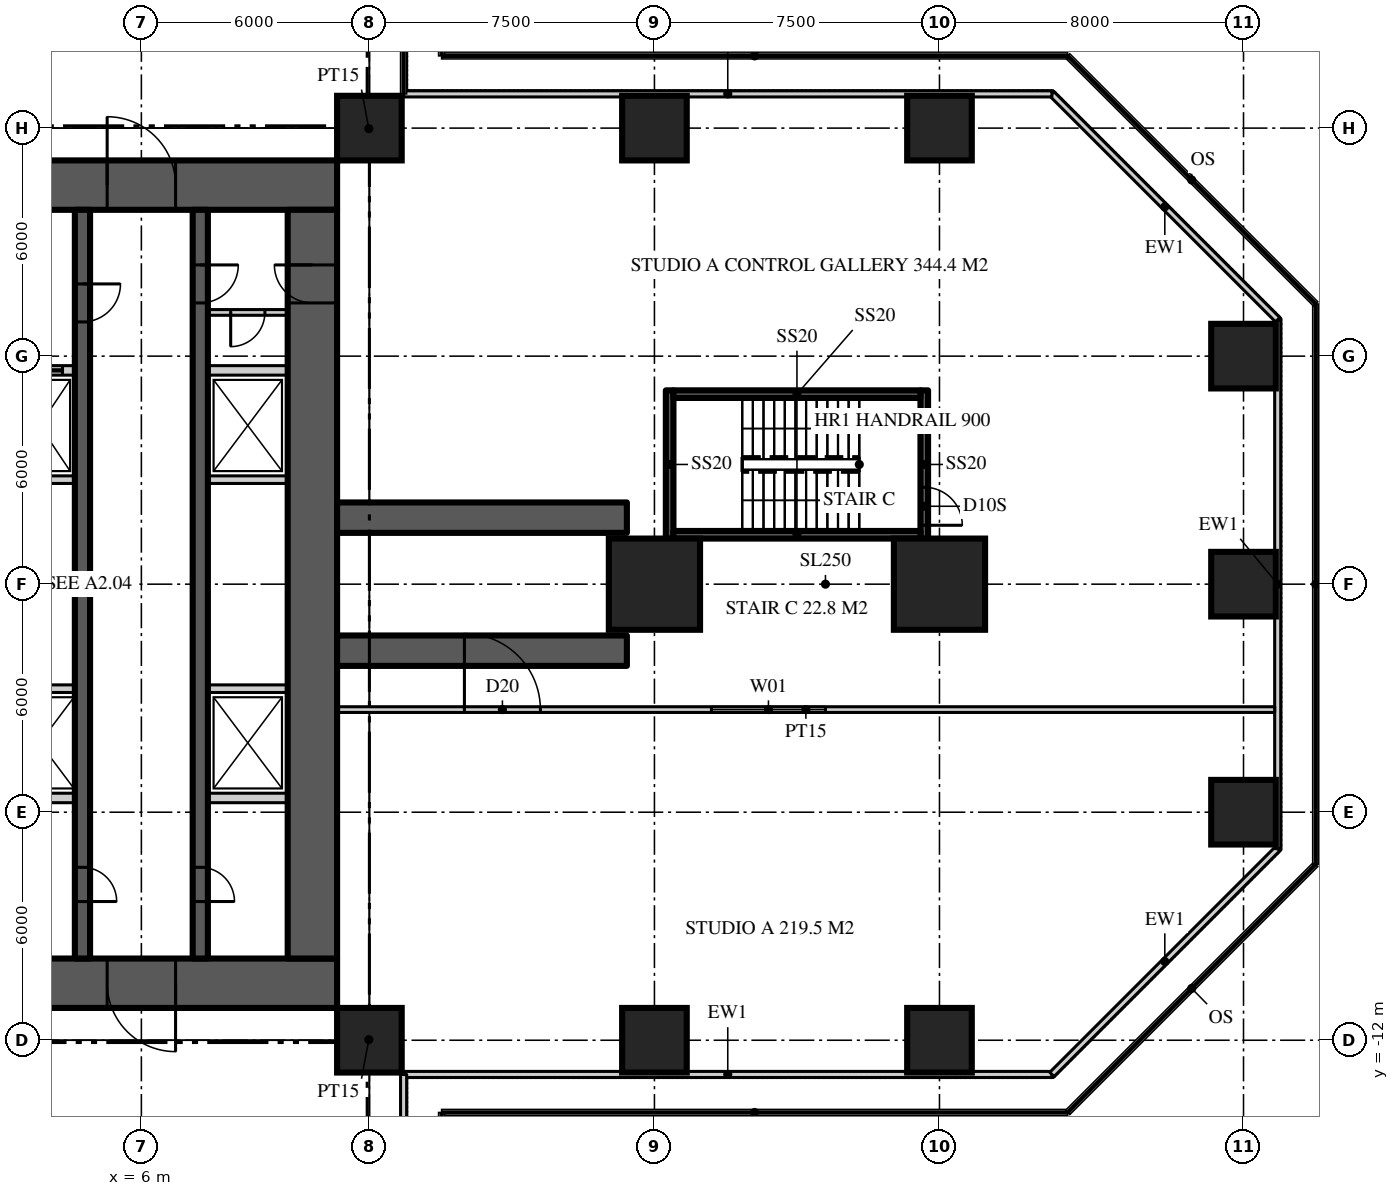
"""IFC4 building model, lengths in metres.
Left out: names, types, materials, properties, quantities, classifications, styles, units other than length and angle.
Written with IfcOpenShell. Run it as: python <this file> out.ifc"""

import sys

from ifc_helpers import new_model, si_unit, direction, frame, frame_2d, origin, origin_2d, place, context, subcontext, project, spatial, rectangle, extrude, element, fill, save


model = new_model("IFC4")
c1 = context("Model", 3, precision=1e-05, world=origin(), true_north=direction((0.0, 1.0)))
c2 = subcontext(c1, "Body", "Model", "MODEL_VIEW")
j1 = project(units=[si_unit("LENGTHUNIT", "METRE"), si_unit("PLANEANGLEUNIT", "RADIAN")], contexts=[c1])
p1 = place(None, origin())
s1 = spatial("IfcSite", under=j1, at=p1, CompositionType="ELEMENT")
p2 = place(p1, origin())
s2 = spatial("IfcBuilding", under=s1, at=p2, CompositionType="ELEMENT")
p3 = place(p2, frame((0.0, 0.0, 7.0)))
s3 = spatial("IfcBuildingStorey", under=s2, at=p3, CompositionType="ELEMENT", Elevation=7.0)
p4 = place(p3, frame((-11.15, 10.5, 0.0), z_axis=(0.0, 0.0, 1.0), x_axis=(1.0, 0.0, 0.0)))
e1 = element("IfcWall", 1, at=p4, inside=s3, PredefinedType="SHEAR", context=c2, shape_type="SweptSolid", body=[
    extrude(rectangle(XDim=22.3, YDim=1.3, at=frame_2d((11.15, 0.0))), origin(), (0.0, 0.0, 1.0), 8.0),
])
p5 = place(p4, frame((4.25, 0.0, 0.0)))
e2 = element("IfcOpeningElement", 2, at=p5, cuts=e1, PredefinedType="OPENING", context=c2, shape_type="SweptSolid", body=[
    extrude(rectangle(XDim=1.8, YDim=2.2, at=frame_2d((0.9, 1.1))), frame((0.0, 0.66, 0.0), z_axis=(0.0, -1.0, 0.0), x_axis=(1.0, 0.0, 0.0)), (0.0, 0.0, 1.0), 1.32),
])
p6 = place(p4, frame((16.25, 0.0, 0.0)))
e3 = element("IfcOpeningElement", 3, at=p6, cuts=e1, PredefinedType="OPENING", context=c2, shape_type="SweptSolid", body=[
    extrude(rectangle(XDim=1.8, YDim=2.2, at=frame_2d((0.9, 1.1))), frame((0.0, 0.66, 0.0), z_axis=(0.0, -1.0, 0.0), x_axis=(1.0, 0.0, 0.0)), (0.0, 0.0, 1.0), 1.32),
])
p7 = place(p3, frame((11.15, -10.5, 0.0), z_axis=(0.0, 0.0, 1.0), x_axis=(-1.0, 0.0, 0.0)))
e4 = element("IfcWall", 4, at=p7, inside=s3, PredefinedType="SHEAR", context=c2, shape_type="SweptSolid", body=[
    extrude(rectangle(XDim=22.3, YDim=1.3, at=frame_2d((11.15, 0.0))), origin(), (0.0, 0.0, 1.0), 8.0),
])
p8 = place(p7, frame((16.25, 0.0, 0.0)))
e5 = element("IfcOpeningElement", 5, at=p8, cuts=e4, PredefinedType="OPENING", context=c2, shape_type="SweptSolid", body=[
    extrude(rectangle(XDim=1.8, YDim=2.2, at=frame_2d((0.9, 1.1))), frame((0.0, 0.66, 0.0), z_axis=(0.0, -1.0, 0.0), x_axis=(1.0, 0.0, 0.0)), (0.0, 0.0, 1.0), 1.32),
])
p9 = place(p7, frame((4.25, 0.0, 0.0)))
e6 = element("IfcOpeningElement", 6, at=p9, cuts=e4, PredefinedType="OPENING", context=c2, shape_type="SweptSolid", body=[
    extrude(rectangle(XDim=1.8, YDim=2.2, at=frame_2d((0.9, 1.1))), frame((0.0, 0.66, 0.0), z_axis=(0.0, -1.0, 0.0), x_axis=(1.0, 0.0, 0.0)), (0.0, 0.0, 1.0), 1.32),
])
p10 = place(p3, frame((10.5, -9.85, 0.0), z_axis=(0.0, 0.0, 1.0), x_axis=(0.0, 1.0, 0.0)))
e7 = element("IfcWall", 7, at=p10, inside=s3, PredefinedType="SHEAR", context=c2, shape_type="SweptSolid", body=[
    extrude(rectangle(XDim=19.7, YDim=1.3, at=frame_2d((9.85, 0.0))), origin(), (0.0, 0.0, 1.0), 8.0),
])
p11 = place(p10, frame((17.25, 0.0, 0.0)))
e8 = element("IfcOpeningElement", 8, at=p11, cuts=e7, PredefinedType="OPENING", context=c2, shape_type="SweptSolid", body=[
    extrude(rectangle(XDim=1.0, YDim=2.2, at=frame_2d((0.5, 1.1))), frame((0.0, 0.66, 0.0), z_axis=(0.0, -1.0, 0.0), x_axis=(1.0, 0.0, 0.0)), (0.0, 0.0, 1.0), 1.32),
])
for number, where, z_axis, x_axis in (
    (9, (11.15, -1.75, 0.0), (0.0, 0.0, 1.0), (1.0, 0.0, 0.0)),
    (10, (11.15, 1.75, 0.0), (0.0, 0.0, 1.0), (1.0, 0.0, 0.0)),
):
    element("IfcWall", number, at=place(p3, frame(where, z_axis=z_axis, x_axis=x_axis)), inside=s3, PredefinedType="SHEAR", context=c2, shape_type="SweptSolid", body=[
        extrude(rectangle(XDim=7.625, YDim=0.8, at=frame_2d((3.812, 0.0))), origin(), (0.0, 0.0, 1.0), 8.0),
    ])
for number, where, z_axis, x_axis in (
    (11, (12.0, -12.0, 0.0), (0.0, 0.0, 1.0), (1.0, 0.0, 0.0)),
    (12, (19.5, -12.0, 0.0), (0.0, 0.0, 1.0), (1.0, 0.0, 0.0)),
    (13, (27.0, -12.0, 0.0), (0.0, 0.0, 1.0), (1.0, 0.0, 0.0)),
    (14, (35.0, -6.0, 0.0), (0.0, 0.0, 1.0), (1.0, 0.0, 0.0)),
):
    element("IfcColumn", number, at=place(p3, frame(where, z_axis=z_axis, x_axis=x_axis)), inside=s3, PredefinedType="COLUMN", context=c2, shape_type="SweptSolid", body=[
        extrude(rectangle(XDim=1.7, YDim=1.7, at=origin_2d()), origin(), (0.0, 0.0, 1.0), 8.0),
    ])
for number, where, z_axis, x_axis in (
    (15, (19.5, 0.0, 0.0), (0.0, 0.0, 1.0), (1.0, 0.0, 0.0)),
    (16, (27.0, 0.0, 0.0), (0.0, 0.0, 1.0), (1.0, 0.0, 0.0)),
):
    element("IfcColumn", number, at=place(p3, frame(where, z_axis=z_axis, x_axis=x_axis)), inside=s3, PredefinedType="COLUMN", context=c2, shape_type="SweptSolid", body=[
        extrude(rectangle(XDim=2.4, YDim=2.4, at=origin_2d()), origin(), (0.0, 0.0, 1.0), 8.0),
    ])
for number, where, z_axis, x_axis in (
    (17, (35.0, 0.0, 0.0), (0.0, 0.0, 1.0), (1.0, 0.0, 0.0)),
    (18, (35.0, 6.0, 0.0), (0.0, 0.0, 1.0), (1.0, 0.0, 0.0)),
    (19, (12.0, 12.0, 0.0), (0.0, 0.0, 1.0), (1.0, 0.0, 0.0)),
    (20, (19.5, 12.0, 0.0), (0.0, 0.0, 1.0), (1.0, 0.0, 0.0)),
    (21, (27.0, 12.0, 0.0), (0.0, 0.0, 1.0), (1.0, 0.0, 0.0)),
):
    element("IfcColumn", number, at=place(p3, frame(where, z_axis=z_axis, x_axis=x_axis)), inside=s3, PredefinedType="COLUMN", context=c2, shape_type="SweptSolid", body=[
        extrude(rectangle(XDim=1.7, YDim=1.7, at=origin_2d()), origin(), (0.0, 0.0, 1.0), 8.0),
    ])
p12 = place(p3, frame((12.9, -12.9, 0.0), z_axis=(0.0, 0.0, 1.0), x_axis=(1.0, 0.0, 0.0)))
e22 = element("IfcWall", 22, at=p12, inside=s3, PredefinedType="SOLIDWALL", context=c2, shape_type="SweptSolid", body=[
    extrude(rectangle(XDim=17.059, YDim=0.16, at=frame_2d((8.529, 0.0))), origin(), (0.0, 0.0, 1.0), 7.75),
])
p13 = place(p3, frame((29.958, -12.9, 0.0), z_axis=(0.0, 0.0, 1.0), x_axis=(0.707106781187, 0.707106781187, 0.0)))
e23 = element("IfcWall", 23, at=p13, inside=s3, PredefinedType="SOLIDWALL", context=c2, shape_type="SweptSolid", body=[
    extrude(rectangle(XDim=8.402, YDim=0.16, at=frame_2d((4.201, 0.0))), origin(), (0.0, 0.0, 1.0), 7.75),
])
p14 = place(p3, frame((35.9, -6.958, 0.0), z_axis=(0.0, 0.0, 1.0), x_axis=(0.0, 1.0, 0.0)))
e24 = element("IfcWall", 24, at=p14, inside=s3, PredefinedType="SOLIDWALL", context=c2, shape_type="SweptSolid", body=[
    extrude(rectangle(XDim=13.917, YDim=0.16, at=frame_2d((6.958, 0.0))), origin(), (0.0, 0.0, 1.0), 7.75),
])
p15 = place(p3, frame((35.9, 6.958, 0.0), z_axis=(0.0, 0.0, 1.0), x_axis=(-0.707106781187, 0.707106781187, 0.0)))
e25 = element("IfcWall", 25, at=p15, inside=s3, PredefinedType="SOLIDWALL", context=c2, shape_type="SweptSolid", body=[
    extrude(rectangle(XDim=8.402, YDim=0.16, at=frame_2d((4.201, 0.0))), origin(), (0.0, 0.0, 1.0), 7.75),
])
for number, where, z_axis, x_axis in (
    (26, (29.958, 12.9, 0.0), (0.0, 0.0, 1.0), (-1.0, 0.0, 0.0)),
    (27, (12.9, -29.958, 0.0), (0.0, 0.0, 1.0), (0.0, 1.0, 0.0)),
):
    element("IfcWall", number, at=place(p3, frame(where, z_axis=z_axis, x_axis=x_axis)), inside=s3, PredefinedType="SOLIDWALL", context=c2, shape_type="SweptSolid", body=[
        extrude(rectangle(XDim=17.059, YDim=0.16, at=frame_2d((8.529, 0.0))), origin(), (0.0, 0.0, 1.0), 7.75),
    ])
p16 = place(p3, frame((7.55, 9.85, 0.0), z_axis=(0.0, 0.0, 1.0), x_axis=(0.0, -1.0, 0.0)))
e28 = element("IfcWall", 28, at=p16, inside=s3, PredefinedType="SHEAR", context=c2, shape_type="SweptSolid", body=[
    extrude(rectangle(XDim=19.7, YDim=0.4, at=frame_2d((9.85, 0.0))), origin(), (0.0, 0.0, 1.0), 8.0),
])
p17 = place(p16, frame((1.45, 0.0, 0.0)))
e29 = element("IfcOpeningElement", 29, at=p17, cuts=e28, PredefinedType="OPENING", context=c2, shape_type="SweptSolid", body=[
    extrude(rectangle(XDim=1.0, YDim=2.2, at=frame_2d((0.5, 1.1))), frame((0.0, 0.21, 0.0), z_axis=(0.0, -1.0, 0.0), x_axis=(1.0, 0.0, 0.0)), (0.0, 0.0, 1.0), 0.42),
])
p18 = place(p16, frame((17.3, 0.0, 0.0)))
e30 = element("IfcOpeningElement", 30, at=p18, cuts=e28, PredefinedType="OPENING", context=c2, shape_type="SweptSolid", body=[
    extrude(rectangle(XDim=0.9, YDim=2.1, at=frame_2d((0.45, 1.05))), frame((0.0, 0.21, 0.0), z_axis=(0.0, -1.0, 0.0), x_axis=(1.0, 0.0, 0.0)), (0.0, 0.0, 1.0), 0.42),
])
p19 = place(p3, frame((4.45, 9.85, 0.0), z_axis=(0.0, 0.0, 1.0), x_axis=(0.0, -1.0, 0.0)))
e31 = element("IfcWall", 31, at=p19, inside=s3, PredefinedType="SHEAR", context=c2, shape_type="SweptSolid", body=[
    extrude(rectangle(XDim=19.7, YDim=0.4, at=frame_2d((9.85, 0.0))), origin(), (0.0, 0.0, 1.0), 8.0),
])
p20 = place(p19, frame((1.95, 0.0, 0.0)))
e32 = element("IfcOpeningElement", 32, at=p20, cuts=e31, PredefinedType="OPENING", context=c2, shape_type="SweptSolid", body=[
    extrude(rectangle(XDim=1.0, YDim=2.2, at=frame_2d((0.5, 1.1))), frame((0.0, 0.21, 0.0), z_axis=(0.0, -1.0, 0.0), x_axis=(1.0, 0.0, 0.0)), (0.0, 0.0, 1.0), 0.42),
])
p21 = place(p19, frame((17.3, 0.0, 0.0)))
e33 = element("IfcOpeningElement", 33, at=p21, cuts=e31, PredefinedType="OPENING", context=c2, shape_type="SweptSolid", body=[
    extrude(rectangle(XDim=0.9, YDim=2.1, at=frame_2d((0.45, 1.05))), frame((0.0, 0.21, 0.0), z_axis=(0.0, -1.0, 0.0), x_axis=(1.0, 0.0, 0.0)), (0.0, 0.0, 1.0), 0.42),
])
p22 = place(p3, frame((2.4, 5.625, 0.0), z_axis=(0.0, 0.0, 1.0), x_axis=(1.0, 0.0, 0.0)))
e34 = element("IfcWall", 34, at=p22, inside=s3, PredefinedType="SOLIDWALL", context=c2, shape_type="SweptSolid", body=[
    extrude(rectangle(XDim=1.85, YDim=0.25, at=frame_2d((0.925, 0.0))), origin(), (0.0, 0.0, 1.0), 7.8),
])
p23 = place(p22, frame((0.325, 0.0, 0.0)))
e35 = element("IfcOpeningElement", 35, at=p23, cuts=e34, PredefinedType="OPENING", context=c2, shape_type="SweptSolid", body=[
    extrude(rectangle(XDim=1.2, YDim=2.2, at=frame_2d((0.6, 1.1))), frame((0.0, 0.135, 0.0), z_axis=(0.0, -1.0, 0.0), x_axis=(1.0, 0.0, 0.0)), (0.0, 0.0, 1.0), 0.27),
])
p24 = place(p3, frame((7.75, 5.625, 0.0), z_axis=(0.0, 0.0, 1.0), x_axis=(1.0, 0.0, 0.0)))
e36 = element("IfcWall", 36, at=p24, inside=s3, PredefinedType="SOLIDWALL", context=c2, shape_type="SweptSolid", body=[
    extrude(rectangle(XDim=2.1, YDim=0.25, at=frame_2d((1.05, 0.0))), origin(), (0.0, 0.0, 1.0), 7.8),
])
p25 = place(p3, frame((2.4, -5.625, 0.0), z_axis=(0.0, 0.0, 1.0), x_axis=(1.0, 0.0, 0.0)))
e37 = element("IfcWall", 37, at=p25, inside=s3, PredefinedType="SOLIDWALL", context=c2, shape_type="SweptSolid", body=[
    extrude(rectangle(XDim=1.85, YDim=0.25, at=frame_2d((0.925, 0.0))), origin(), (0.0, 0.0, 1.0), 7.8),
])
p26 = place(p3, frame((7.75, -5.625, 0.0), z_axis=(0.0, 0.0, 1.0), x_axis=(1.0, 0.0, 0.0)))
e38 = element("IfcWall", 38, at=p26, inside=s3, PredefinedType="SOLIDWALL", context=c2, shape_type="SweptSolid", body=[
    extrude(rectangle(XDim=2.1, YDim=0.25, at=frame_2d((1.05, 0.0))), origin(), (0.0, 0.0, 1.0), 7.8),
])
p27 = place(p3, frame((2.4, -2.75, 0.0), z_axis=(0.0, 0.0, 1.0), x_axis=(1.0, 0.0, 0.0)))
e39 = element("IfcWall", 39, at=p27, inside=s3, PredefinedType="SOLIDWALL", context=c2, shape_type="SweptSolid", body=[
    extrude(rectangle(XDim=1.85, YDim=0.2, at=frame_2d((0.925, 0.0))), origin(), (0.0, 0.0, 1.0), 7.8),
])
p28 = place(p3, frame((7.75, -2.75, 0.0), z_axis=(0.0, 0.0, 1.0), x_axis=(1.0, 0.0, 0.0)))
e40 = element("IfcWall", 40, at=p28, inside=s3, PredefinedType="SOLIDWALL", context=c2, shape_type="SweptSolid", body=[
    extrude(rectangle(XDim=2.1, YDim=0.2, at=frame_2d((1.05, 0.0))), origin(), (0.0, 0.0, 1.0), 7.8),
])
p29 = place(p3, frame((2.4, 2.75, 0.0), z_axis=(0.0, 0.0, 1.0), x_axis=(1.0, 0.0, 0.0)))
e41 = element("IfcWall", 41, at=p29, inside=s3, PredefinedType="SOLIDWALL", context=c2, shape_type="SweptSolid", body=[
    extrude(rectangle(XDim=1.85, YDim=0.2, at=frame_2d((0.925, 0.0))), origin(), (0.0, 0.0, 1.0), 7.8),
])
p30 = place(p3, frame((7.75, 2.75, 0.0), z_axis=(0.0, 0.0, 1.0), x_axis=(1.0, 0.0, 0.0)))
e42 = element("IfcWall", 42, at=p30, inside=s3, PredefinedType="SOLIDWALL", context=c2, shape_type="SweptSolid", body=[
    extrude(rectangle(XDim=2.1, YDim=0.2, at=frame_2d((1.05, 0.0))), origin(), (0.0, 0.0, 1.0), 7.8),
])
p31 = place(p3, frame((11.15, -3.3, 0.0), z_axis=(0.0, 0.0, 1.0), x_axis=(1.0, 0.0, 0.0)))
e43 = element("IfcWall", 43, at=p31, inside=s3, PredefinedType="PARTITIONING", context=c2, shape_type="SweptSolid", body=[
    extrude(rectangle(XDim=24.67, YDim=0.15, at=frame_2d((12.335, 0.0))), origin(), (0.0, 0.0, 1.0), 7.75),
])
p32 = place(p31, frame((3.35, 0.0, 0.0)))
e44 = element("IfcOpeningElement", 44, at=p32, cuts=e43, PredefinedType="OPENING", context=c2, shape_type="SweptSolid", body=[
    extrude(rectangle(XDim=2.0, YDim=2.6, at=frame_2d((1.0, 1.3))), frame((0.0, 0.085, 0.0), z_axis=(0.0, -1.0, 0.0), x_axis=(1.0, 0.0, 0.0)), (0.0, 0.0, 1.0), 0.17),
])
p33 = place(p31, frame((9.85, 0.0, 0.9)))
e45 = element("IfcOpeningElement", 45, at=p33, cuts=e43, PredefinedType="OPENING", context=c2, shape_type="SweptSolid", body=[
    extrude(rectangle(XDim=3.0, YDim=1.5, at=frame_2d((1.5, 0.75))), frame((0.0, 0.085, 0.0), z_axis=(0.0, -1.0, 0.0), x_axis=(1.0, 0.0, 0.0)), (0.0, 0.0, 1.0), 0.17),
])
for number, where, z_axis, x_axis in (
    (46, (11.15, 11.15, 0.0), (0.0, 0.0, 1.0), (0.707, 0.707, 0.0)),
    (47, (11.15, -11.15, 0.0), (0.0, 0.0, 1.0), (0.707, -0.707, 0.0)),
):
    element("IfcWall", number, at=place(p3, frame(where, z_axis=z_axis, x_axis=x_axis)), inside=s3, PredefinedType="PARTITIONING", context=c2, shape_type="SweptSolid", body=[
        extrude(rectangle(XDim=2.362, YDim=0.15, at=frame_2d((1.181, 0.0))), origin(), (0.0, 0.0, 1.0), 7.75),
    ])
p34 = place(p3, frame((9.85, 7.15, 0.0), z_axis=(0.0, 0.0, 1.0), x_axis=(-1.0, 0.0, 0.0)))
e48 = element("IfcWall", 48, at=p34, inside=s3, PredefinedType="SOLIDWALL", context=c2, shape_type="SweptSolid", body=[
    extrude(rectangle(XDim=2.1, YDim=0.15, at=frame_2d((1.05, 0.0))), origin(), (0.0, 0.0, 1.0), 7.75),
])
p35 = place(p34, frame((0.6, 0.0, 0.0)))
e49 = element("IfcOpeningElement", 49, at=p35, cuts=e48, PredefinedType="OPENING", context=c2, shape_type="SweptSolid", body=[
    extrude(rectangle(XDim=0.9, YDim=2.1, at=frame_2d((0.45, 1.05))), frame((0.0, 0.085, 0.0), z_axis=(0.0, -1.0, 0.0), x_axis=(1.0, 0.0, 0.0)), (0.0, 0.0, 1.0), 0.17),
])
p36 = place(p3, frame((19.9, 1.2, 0.0), z_axis=(0.0, 0.0, 1.0), x_axis=(0.0, 1.0, 0.0)))
e50 = element("IfcWall", 50, at=p36, inside=s3, PredefinedType="SOLIDWALL", context=c2, shape_type="SweptSolid", body=[
    extrude(rectangle(XDim=3.9, YDim=0.2, at=frame_2d((1.95, 0.0))), origin(), (0.0, 0.0, 1.0), 7.75),
])
p37 = place(p3, frame((26.6, 5.1, 0.0), z_axis=(0.0, 0.0, 1.0), x_axis=(0.0, -1.0, 0.0)))
e51 = element("IfcWall", 51, at=p37, inside=s3, PredefinedType="SOLIDWALL", context=c2, shape_type="SweptSolid", body=[
    extrude(rectangle(XDim=3.9, YDim=0.2, at=frame_2d((1.95, 0.0))), origin(), (0.0, 0.0, 1.0), 7.75),
])
p38 = place(p37, frame((2.55, 0.0, 0.0)))
e52 = element("IfcOpeningElement", 52, at=p38, cuts=e51, PredefinedType="OPENING", context=c2, shape_type="SweptSolid", body=[
    extrude(rectangle(XDim=1.0, YDim=2.2, at=frame_2d((0.5, 1.1))), frame((0.0, 0.11, 0.0), z_axis=(0.0, -1.0, 0.0), x_axis=(1.0, 0.0, 0.0)), (0.0, 0.0, 1.0), 0.22),
])
for number, where, z_axis, x_axis in (
    (53, (20.0, 1.3, 0.0), (0.0, 0.0, 1.0), (1.0, 0.0, 0.0)),
    (54, (26.5, 5.0, 0.0), (0.0, 0.0, 1.0), (-1.0, 0.0, 0.0)),
):
    element("IfcWall", number, at=place(p3, frame(where, z_axis=z_axis, x_axis=x_axis)), inside=s3, PredefinedType="SOLIDWALL", context=c2, shape_type="SweptSolid", body=[
        extrude(rectangle(XDim=6.5, YDim=0.2, at=frame_2d((3.25, 0.0))), origin(), (0.0, 0.0, 1.0), 7.75),
    ])
p39 = place(p6, origin())
e55 = element("IfcDoor", 55, at=p39, inside=s3, OperationType="DOUBLE_DOOR_DOUBLE_SWING", PredefinedType="DOOR", context=c2, shape_type="SweptSolid", body=[
    extrude(rectangle(XDim=1.8, YDim=2.2, at=frame_2d((0.9, 1.1))), frame((0.0, 0.025, 0.0), z_axis=(0.0, -1.0, 0.0), x_axis=(1.0, 0.0, 0.0)), (0.0, 0.0, 1.0), 0.05),
])
fill(e3, e55)
p40 = place(p9, origin())
e56 = element("IfcDoor", 56, at=p40, inside=s3, OperationType="DOUBLE_DOOR_DOUBLE_SWING", PredefinedType="DOOR", context=c2, shape_type="SweptSolid", body=[
    extrude(rectangle(XDim=1.8, YDim=2.2, at=frame_2d((0.9, 1.1))), frame((0.0, 0.025, 0.0), z_axis=(0.0, -1.0, 0.0), x_axis=(1.0, 0.0, 0.0)), (0.0, 0.0, 1.0), 0.05),
])
fill(e6, e56)
p41 = place(p17, origin())
e57 = element("IfcDoor", 57, at=p41, inside=s3, OperationType="SINGLE_SWING_LEFT", PredefinedType="DOOR", context=c2, shape_type="SweptSolid", body=[
    extrude(rectangle(XDim=1.0, YDim=2.2, at=frame_2d((0.5, 1.1))), frame((0.0, 0.025, 0.0), z_axis=(0.0, -1.0, 0.0), x_axis=(1.0, 0.0, 0.0)), (0.0, 0.0, 1.0), 0.05),
])
fill(e29, e57)
p42 = place(p11, origin())
e58 = element("IfcDoor", 58, at=p42, inside=s3, OperationType="SINGLE_SWING_RIGHT", PredefinedType="DOOR", context=c2, shape_type="SweptSolid", body=[
    extrude(rectangle(XDim=1.0, YDim=2.2, at=frame_2d((0.5, 1.1))), frame((0.0, 0.025, 0.0), z_axis=(0.0, -1.0, 0.0), x_axis=(1.0, 0.0, 0.0)), (0.0, 0.0, 1.0), 0.05),
])
fill(e8, e58)
p43 = place(p20, origin())
e59 = element("IfcDoor", 59, at=p43, inside=s3, OperationType="SINGLE_SWING_LEFT", PredefinedType="DOOR", context=c2, shape_type="SweptSolid", body=[
    extrude(rectangle(XDim=1.0, YDim=2.2, at=frame_2d((0.5, 1.1))), frame((0.0, 0.025, 0.0), z_axis=(0.0, -1.0, 0.0), x_axis=(1.0, 0.0, 0.0)), (0.0, 0.0, 1.0), 0.05),
])
fill(e32, e59)
p44 = place(p18, origin())
e60 = element("IfcDoor", 60, at=p44, inside=s3, OperationType="SINGLE_SWING_RIGHT", PredefinedType="DOOR", context=c2, shape_type="SweptSolid", body=[
    extrude(rectangle(XDim=0.9, YDim=2.1, at=frame_2d((0.45, 1.05))), frame((0.0, 0.025, 0.0), z_axis=(0.0, -1.0, 0.0), x_axis=(1.0, 0.0, 0.0)), (0.0, 0.0, 1.0), 0.05),
])
fill(e30, e60)
p45 = place(p21, origin())
e61 = element("IfcDoor", 61, at=p45, inside=s3, OperationType="SINGLE_SWING_RIGHT", PredefinedType="DOOR", context=c2, shape_type="SweptSolid", body=[
    extrude(rectangle(XDim=0.9, YDim=2.1, at=frame_2d((0.45, 1.05))), frame((0.0, 0.025, 0.0), z_axis=(0.0, -1.0, 0.0), x_axis=(1.0, 0.0, 0.0)), (0.0, 0.0, 1.0), 0.05),
])
fill(e33, e61)
p46 = place(p23, origin())
e62 = element("IfcDoor", 62, at=p46, inside=s3, OperationType="SLIDING_TO_LEFT", PredefinedType="DOOR", context=c2, shape_type="SweptSolid", body=[
    extrude(rectangle(XDim=1.2, YDim=2.2, at=frame_2d((0.6, 1.1))), frame((0.0, 0.025, 0.0), z_axis=(0.0, -1.0, 0.0), x_axis=(1.0, 0.0, 0.0)), (0.0, 0.0, 1.0), 0.05),
])
fill(e35, e62)
p47 = place(p32, origin())
e63 = element("IfcDoor", 63, at=p47, inside=s3, OperationType="DOUBLE_DOOR_DOUBLE_SWING", PredefinedType="DOOR", context=c2, shape_type="SweptSolid", body=[
    extrude(rectangle(XDim=2.0, YDim=2.6, at=frame_2d((1.0, 1.3))), frame((0.0, 0.025, 0.0), z_axis=(0.0, -1.0, 0.0), x_axis=(1.0, 0.0, 0.0)), (0.0, 0.0, 1.0), 0.05),
])
fill(e44, e63)
p48 = place(p35, origin())
e64 = element("IfcDoor", 64, at=p48, inside=s3, OperationType="SINGLE_SWING_RIGHT", PredefinedType="DOOR", context=c2, shape_type="SweptSolid", body=[
    extrude(rectangle(XDim=0.9, YDim=2.1, at=frame_2d((0.45, 1.05))), frame((0.0, 0.025, 0.0), z_axis=(0.0, -1.0, 0.0), x_axis=(1.0, 0.0, 0.0)), (0.0, 0.0, 1.0), 0.05),
])
fill(e49, e64)
p49 = place(p38, origin())
e65 = element("IfcDoor", 65, at=p49, inside=s3, OperationType="SINGLE_SWING_RIGHT", PredefinedType="DOOR", context=c2, shape_type="SweptSolid", body=[
    extrude(rectangle(XDim=1.0, YDim=2.2, at=frame_2d((0.5, 1.1))), frame((0.0, 0.025, 0.0), z_axis=(0.0, -1.0, 0.0), x_axis=(1.0, 0.0, 0.0)), (0.0, 0.0, 1.0), 0.05),
])
fill(e52, e65)
p50 = place(p33, origin())
e66 = element("IfcWindow", 66, at=p50, inside=s3, PartitioningType="SINGLE_PANEL", PredefinedType="WINDOW", context=c2, shape_type="SweptSolid", body=[
    extrude(rectangle(XDim=3.0, YDim=1.5, at=frame_2d((1.5, 0.75))), frame((0.0, 0.03, 0.0), z_axis=(0.0, -1.0, 0.0), x_axis=(1.0, 0.0, 0.0)), (0.0, 0.0, 1.0), 0.06),
])
fill(e45, e66)
save(model, sys.argv[1])
